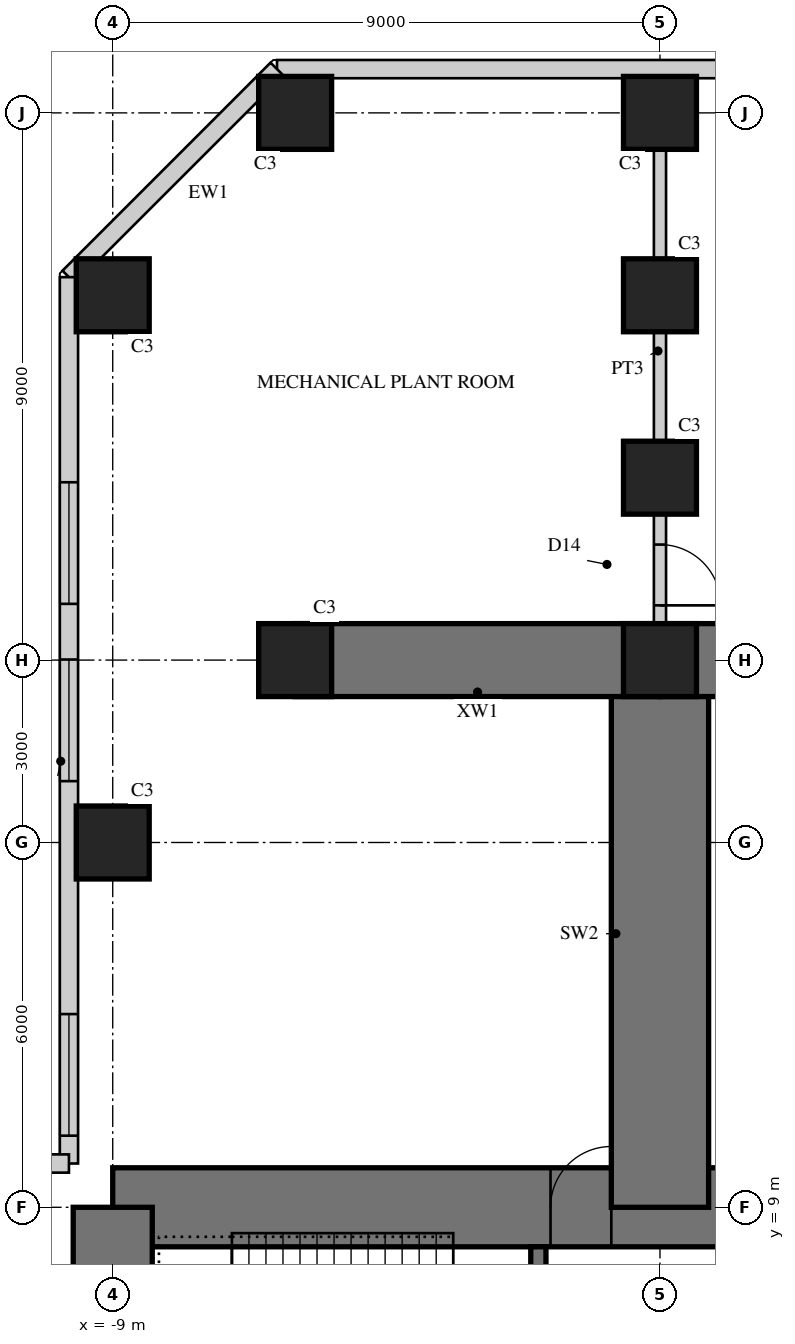
"""IFC4 building model, lengths in metres.
Left out: names, types, materials, properties, quantities, classifications, styles, units other than length and angle.
Written with IfcOpenShell. Run it as: python <this file> out.ifc"""

import sys

from ifc_helpers import new_model, si_unit, direction, frame, frame_2d, origin, origin_2d, place, context, subcontext, project, spatial, rectangle, hollow_rectangle, extrude, element, fill, save


model = new_model("IFC4")
c1 = context("Model", 3, precision=1e-05, world=origin(), true_north=direction((0.0, 1.0)))
c2 = subcontext(c1, "Body", "Model", "MODEL_VIEW")
j1 = project(units=[si_unit("LENGTHUNIT", "METRE"), si_unit("PLANEANGLEUNIT", "RADIAN")], contexts=[c1])
p1 = place(None, origin())
s1 = spatial("IfcSite", under=j1, at=p1, CompositionType="ELEMENT")
p2 = place(p1, origin())
s2 = spatial("IfcBuilding", under=s1, at=p2, CompositionType="ELEMENT")
p3 = place(p2, frame((0.0, 0.0, 18.5)))
s3 = spatial("IfcBuildingStorey", under=s2, at=p3, CompositionType="ELEMENT", Elevation=18.5)
p4 = place(p3, frame((9.0, 9.0, 0.0), z_axis=(0.0, 0.0, 1.0), x_axis=(-1.0, 0.0, 0.0)))
e1 = element("IfcWall", 1, at=p4, inside=s3, PredefinedType="SHEAR", context=c2, shape_type="SweptSolid", body=[
    extrude(rectangle(XDim=18.0, YDim=1.3, at=frame_2d((9.0, 0.0))), origin(), (0.0, 0.0, 1.0), 5.0),
])
p5 = place(p4, frame((9.8, 0.0, 0.0)))
e2 = element("IfcOpeningElement", 2, at=p5, cuts=e1, PredefinedType="OPENING", context=c2, shape_type="SweptSolid", body=[
    extrude(rectangle(XDim=1.0, YDim=2.4, at=frame_2d((0.5, 1.2))), frame((0.0, 0.66, 0.0), z_axis=(0.0, -1.0, 0.0), x_axis=(1.0, 0.0, 0.0)), (0.0, 0.0, 1.0), 1.32),
])
p6 = place(p3, frame((-9.0, 9.0, 0.0), z_axis=(0.0, 0.0, 1.0), x_axis=(0.0, -1.0, 0.0)))
e3 = element("IfcWall", 3, at=p6, inside=s3, PredefinedType="SHEAR", context=c2, shape_type="SweptSolid", body=[
    extrude(rectangle(XDim=18.0, YDim=1.3, at=frame_2d((9.0, 0.0))), origin(), (0.0, 0.0, 1.0), 5.0),
])
p7 = place(p6, frame((9.8, 0.0, 0.0)))
e4 = element("IfcOpeningElement", 4, at=p7, cuts=e3, PredefinedType="OPENING", context=c2, shape_type="SweptSolid", body=[
    extrude(rectangle(XDim=1.0, YDim=2.4, at=frame_2d((0.5, 1.2))), frame((0.0, 0.66, 0.0), z_axis=(0.0, -1.0, 0.0), x_axis=(1.0, 0.0, 0.0)), (0.0, 0.0, 1.0), 1.32),
])
p8 = place(p3, frame((-2.0, 1.675, 0.0), z_axis=(0.0, 0.0, 1.0), x_axis=(0.0, 1.0, 0.0)))
e5 = element("IfcWall", 5, at=p8, inside=s3, PredefinedType="SHEAR", context=c2, shape_type="SweptSolid", body=[
    extrude(rectangle(XDim=6.675, YDim=0.25, at=frame_2d((3.337, 0.0))), origin(), (0.0, 0.0, 1.0), 5.0),
])
p9 = place(p8, frame((0.725, 0.0, 0.0)))
e6 = element("IfcOpeningElement", 6, at=p9, cuts=e5, PredefinedType="OPENING", context=c2, shape_type="SweptSolid", body=[
    extrude(rectangle(XDim=1.0, YDim=2.1, at=frame_2d((0.5, 1.05))), frame((0.0, 0.135, 0.0), z_axis=(0.0, -1.0, 0.0), x_axis=(1.0, 0.0, 0.0)), (0.0, 0.0, 1.0), 0.27),
])
p10 = place(p3, frame((0.0, 9.0, 0.0), z_axis=(0.0, 0.0, 1.0), x_axis=(0.0, 1.0, 0.0)))
e7 = element("IfcWall", 7, at=p10, inside=s3, PredefinedType="SHEAR", context=c2, shape_type="SweptSolid", body=[
    extrude(rectangle(XDim=9.0, YDim=1.6, at=frame_2d((4.5, 0.0))), origin(), (0.0, 0.0, 1.0), 5.0),
])
for number, where, z_axis, x_axis in (
    (8, (0.0, 18.0, 0.0), (0.0, 0.0, 1.0), (-1.0, 0.0, 0.0)),
    (9, (0.0, 18.0, 0.0), (0.0, 0.0, 1.0), (1.0, 0.0, 0.0)),
):
    element("IfcWall", number, at=place(p3, frame(where, z_axis=z_axis, x_axis=x_axis)), inside=s3, PredefinedType="SHEAR", context=c2, shape_type="SweptSolid", body=[
        extrude(rectangle(XDim=6.0, YDim=1.2, at=frame_2d((3.0, 0.0))), origin(), (0.0, 0.0, 1.0), 5.0),
    ])
for number, where, z_axis, x_axis in (
    (10, (-9.0, 15.0, 0.0), (0.0, 0.0, 1.0), (1.0, 0.0, 0.0)),
    (11, (-9.0, 24.0, 0.0), (0.0, 0.0, 1.0), (1.0, 0.0, 0.0)),
    (12, (0.0, 27.0, 0.0), (0.0, 0.0, 1.0), (1.0, 0.0, 0.0)),
    (13, (-6.0, 27.0, 0.0), (0.0, 0.0, 1.0), (1.0, 0.0, 0.0)),
    (14, (0.0, 18.0, 0.0), (0.0, 0.0, 1.0), (1.0, 0.0, 0.0)),
    (15, (-6.0, 18.0, 0.0), (0.0, 0.0, 1.0), (1.0, 0.0, 0.0)),
    (16, (0.0, 21.0, 0.0), (0.0, 0.0, 1.0), (1.0, 0.0, 0.0)),
    (17, (0.0, 24.0, 0.0), (0.0, 0.0, 1.0), (1.0, 0.0, 0.0)),
):
    element("IfcColumn", number, at=place(p3, frame(where, z_axis=z_axis, x_axis=x_axis)), inside=s3, PredefinedType="COLUMN", context=c2, shape_type="SweptSolid", body=[
        extrude(rectangle(XDim=1.2, YDim=1.2, at=origin_2d()), origin(), (0.0, 0.0, 1.0), 5.0),
    ])
p11 = place(p3, frame((6.298, 27.72, 0.0), z_axis=(0.0, 0.0, 1.0), x_axis=(-1.0, 0.0, 0.0)))
e18 = element("IfcWall", 18, at=p11, inside=s3, PredefinedType="SOLIDWALL", context=c2, shape_type="SweptSolid", body=[
    extrude(rectangle(XDim=12.597, YDim=0.3, at=frame_2d((6.298, 0.0))), origin(), (0.0, 0.0, 1.0), 4.8),
])
p12 = place(p3, frame((-6.298, 27.72, 0.0), z_axis=(0.0, 0.0, 1.0), x_axis=(-0.707106781187, -0.707106781187, 0.0)))
e19 = element("IfcWall", 19, at=p12, inside=s3, PredefinedType="SOLIDWALL", context=c2, shape_type="SweptSolid", body=[
    extrude(rectangle(XDim=4.839, YDim=0.3, at=frame_2d((2.419, 0.0))), origin(), (0.0, 0.0, 1.0), 4.8),
])
p13 = place(p3, frame((-9.72, 24.298, 0.0), z_axis=(0.0, 0.0, 1.0), x_axis=(0.0, -1.0, 0.0)))
e20 = element("IfcWall", 20, at=p13, inside=s3, PredefinedType="SOLIDWALL", context=c2, shape_type="SweptSolid", body=[
    extrude(rectangle(XDim=14.578, YDim=0.3, at=frame_2d((7.289, 0.0))), origin(), (0.0, 0.0, 1.0), 4.8),
])
p14 = place(p13, frame((3.374, 0.0, 0.8)))
e21 = element("IfcOpeningElement", 21, at=p14, cuts=e20, PredefinedType="OPENING", context=c2, shape_type="SweptSolid", body=[
    extrude(rectangle(XDim=2.0, YDim=2.5, at=frame_2d((1.0, 1.25))), frame((0.0, 0.16, 0.0), z_axis=(0.0, -1.0, 0.0), x_axis=(1.0, 0.0, 0.0)), (0.0, 0.0, 1.0), 0.32),
])
p15 = place(p13, frame((6.289, 0.0, 0.8)))
e22 = element("IfcOpeningElement", 22, at=p15, cuts=e20, PredefinedType="OPENING", context=c2, shape_type="SweptSolid", body=[
    extrude(rectangle(XDim=2.0, YDim=2.5, at=frame_2d((1.0, 1.25))), frame((0.0, 0.16, 0.0), z_axis=(0.0, -1.0, 0.0), x_axis=(1.0, 0.0, 0.0)), (0.0, 0.0, 1.0), 0.32),
])
p16 = place(p13, frame((12.12, 0.0, 0.8)))
e23 = element("IfcOpeningElement", 23, at=p16, cuts=e20, PredefinedType="OPENING", context=c2, shape_type="SweptSolid", body=[
    extrude(rectangle(XDim=2.0, YDim=2.5, at=frame_2d((1.0, 1.25))), frame((0.0, 0.16, 0.0), z_axis=(0.0, -1.0, 0.0), x_axis=(1.0, 0.0, 0.0)), (0.0, 0.0, 1.0), 0.32),
])
p17 = place(p3, frame((-9.72, 9.72, 0.0), z_axis=(0.0, 0.0, 1.0), x_axis=(-1.0, 0.0, 0.0)))
e24 = element("IfcWall", 24, at=p17, inside=s3, PredefinedType="SOLIDWALL", context=c2, shape_type="SweptSolid", body=[
    extrude(rectangle(XDim=14.578, YDim=0.3, at=frame_2d((7.289, 0.0))), origin(), (0.0, 0.0, 1.0), 4.8),
])
p18 = place(p17, frame((0.458, 0.0, 0.8)))
e25 = element("IfcOpeningElement", 25, at=p18, cuts=e24, PredefinedType="OPENING", context=c2, shape_type="SweptSolid", body=[
    extrude(rectangle(XDim=2.0, YDim=2.5, at=frame_2d((1.0, 1.25))), frame((0.0, 0.16, 0.0), z_axis=(0.0, -1.0, 0.0), x_axis=(1.0, 0.0, 0.0)), (0.0, 0.0, 1.0), 0.32),
])
p19 = place(p17, frame((9.205, 0.0, 0.8)))
e26 = element("IfcOpeningElement", 26, at=p19, cuts=e24, PredefinedType="OPENING", context=c2, shape_type="SweptSolid", body=[
    extrude(rectangle(XDim=2.0, YDim=2.5, at=frame_2d((1.0, 1.25))), frame((0.0, 0.16, 0.0), z_axis=(0.0, -1.0, 0.0), x_axis=(1.0, 0.0, 0.0)), (0.0, 0.0, 1.0), 0.32),
])
p20 = place(p3, frame((0.0, 18.0, 0.0), z_axis=(0.0, 0.0, 1.0), x_axis=(0.0, 1.0, 0.0)))
e27 = element("IfcWall", 27, at=p20, inside=s3, PredefinedType="SOLIDWALL", context=c2, shape_type="SweptSolid", body=[
    extrude(rectangle(XDim=3.0, YDim=0.2, at=frame_2d((1.5, 0.0))), origin(), (0.0, 0.0, 1.0), 4.8),
])
p21 = place(p20, frame((0.9, 0.0, 0.0)))
e28 = element("IfcOpeningElement", 28, at=p21, cuts=e27, PredefinedType="OPENING", context=c2, shape_type="SweptSolid", body=[
    extrude(rectangle(XDim=1.0, YDim=2.2, at=frame_2d((0.5, 1.1))), frame((0.0, 0.11, 0.0), z_axis=(0.0, -1.0, 0.0), x_axis=(1.0, 0.0, 0.0)), (0.0, 0.0, 1.0), 0.22),
])
p22 = place(p3, frame((0.0, 21.0, 0.0), z_axis=(0.0, 0.0, 1.0), x_axis=(0.0, 1.0, 0.0)))
e29 = element("IfcWall", 29, at=p22, inside=s3, PredefinedType="SOLIDWALL", context=c2, shape_type="SweptSolid", body=[
    extrude(rectangle(XDim=6.0, YDim=0.2, at=frame_2d((3.0, 0.0))), origin(), (0.0, 0.0, 1.0), 3.8),
])
p23 = place(p14, origin())
e30 = element("IfcWindow", 30, at=p23, inside=s3, PartitioningType="SINGLE_PANEL", PredefinedType="WINDOW", context=c2, shape_type="SweptSolid", body=[
    extrude(hollow_rectangle(XDim=2.0, YDim=2.5, WallThickness=0.06, at=frame_2d((1.0, 1.25))), frame((0.0, 0.03, 0.0), z_axis=(0.0, -1.0, 0.0), x_axis=(1.0, 0.0, 0.0)), (0.0, 0.0, 1.0), 0.06),
    extrude(rectangle(XDim=1.879, YDim=2.379, at=frame_2d((1.0, 1.25))), frame((0.0, 0.03, 0.0), z_axis=(0.0, -1.0, 0.0), x_axis=(1.0, 0.0, 0.0)), (0.0, 0.0, 1.0), 0.06),
])
fill(e21, e30)
p24 = place(p15, origin())
e31 = element("IfcWindow", 31, at=p24, inside=s3, PartitioningType="SINGLE_PANEL", PredefinedType="WINDOW", context=c2, shape_type="SweptSolid", body=[
    extrude(hollow_rectangle(XDim=2.0, YDim=2.5, WallThickness=0.06, at=frame_2d((1.0, 1.25))), frame((0.0, 0.03, 0.0), z_axis=(0.0, -1.0, 0.0), x_axis=(1.0, 0.0, 0.0)), (0.0, 0.0, 1.0), 0.06),
    extrude(rectangle(XDim=1.879, YDim=2.379, at=frame_2d((1.0, 1.25))), frame((0.0, 0.03, 0.0), z_axis=(0.0, -1.0, 0.0), x_axis=(1.0, 0.0, 0.0)), (0.0, 0.0, 1.0), 0.06),
])
fill(e22, e31)
p25 = place(p16, origin())
e32 = element("IfcWindow", 32, at=p25, inside=s3, PartitioningType="SINGLE_PANEL", PredefinedType="WINDOW", context=c2, shape_type="SweptSolid", body=[
    extrude(hollow_rectangle(XDim=2.0, YDim=2.5, WallThickness=0.06, at=frame_2d((1.0, 1.25))), frame((0.0, 0.03, 0.0), z_axis=(0.0, -1.0, 0.0), x_axis=(1.0, 0.0, 0.0)), (0.0, 0.0, 1.0), 0.06),
    extrude(rectangle(XDim=1.879, YDim=2.379, at=frame_2d((1.0, 1.25))), frame((0.0, 0.03, 0.0), z_axis=(0.0, -1.0, 0.0), x_axis=(1.0, 0.0, 0.0)), (0.0, 0.0, 1.0), 0.06),
])
fill(e23, e32)
p26 = place(p21, frame((1.0, 0.0, 0.0), z_axis=(0.0, 0.0, 1.0), x_axis=(-1.0, 0.0, 0.0)))
e33 = element("IfcDoor", 33, at=p26, inside=s3, OperationType="SINGLE_SWING_RIGHT", PredefinedType="DOOR", context=c2, shape_type="SweptSolid", body=[
    extrude(rectangle(XDim=1.0, YDim=2.2, at=frame_2d((0.5, 1.1))), frame((0.0, 0.025, 0.0), z_axis=(0.0, -1.0, 0.0), x_axis=(1.0, 0.0, 0.0)), (0.0, 0.0, 1.0), 0.05),
])
fill(e28, e33)
p27 = place(p5, frame((1.0, 0.0, 0.0), z_axis=(0.0, 0.0, 1.0), x_axis=(-1.0, 0.0, 0.0)))
e34 = element("IfcDoor", 34, at=p27, inside=s3, OperationType="SINGLE_SWING_RIGHT", PredefinedType="DOOR", context=c2, shape_type="SweptSolid", body=[
    extrude(rectangle(XDim=1.0, YDim=2.4, at=frame_2d((0.5, 1.2))), frame((0.0, -0.005, 0.0), z_axis=(0.0, -1.0, 0.0), x_axis=(1.0, 0.0, 0.0)), (0.0, 0.0, 1.0), 0.05),
])
fill(e2, e34)
save(model, sys.argv[1])
